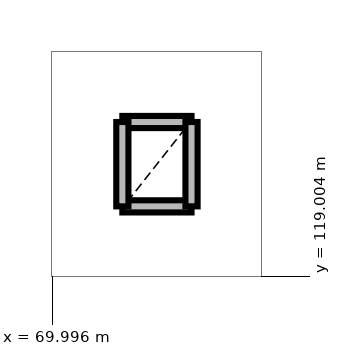
"""IFC4 building model, lengths in metres.
Left out: names, types, materials, properties, quantities, classifications, styles, units other than length and angle.
Written with IfcOpenShell. Run it as: python <this file> out.ifc"""

import sys

from ifc_helpers import new_model, si_unit, direction, frame, frame_2d, origin, place, context, subcontext, project, spatial, rectangle, extrude, element, save


model = new_model("IFC4")
c1 = context("Model", 3, precision=1e-05, world=origin(), true_north=direction((0.0, 1.0)))
c2 = subcontext(c1, "Body", "Model", "MODEL_VIEW")
j1 = project(units=[si_unit("LENGTHUNIT", "METRE"), si_unit("PLANEANGLEUNIT", "RADIAN")], contexts=[c1])
p1 = place(None, origin())
s1 = spatial("IfcSite", under=j1, at=p1, CompositionType="ELEMENT")
p2 = place(p1, origin())
s2 = spatial("IfcBuilding", under=s1, at=p2, CompositionType="ELEMENT")
p3 = place(p2, origin())
s3 = spatial("IfcBuildingStorey", under=s2, at=p3, CompositionType="ELEMENT", Elevation=0.0)
for number, where, z_axis, x_axis in (
    (1, (70.92, 119.92, 0.0), (0.0, 0.0, 1.0), (1.0, 0.0, 0.0)),
    (2, (71.83, 121.03, 0.0), (0.0, 0.0, 1.0), (-1.0, 0.0, 0.0)),
):
    element("IfcWall", number, at=place(p3, frame(where, z_axis=z_axis, x_axis=x_axis)), inside=s3, PredefinedType="PARTITIONING", context=c2, shape_type="SweptSolid", body=[
        extrude(rectangle(XDim=0.91, YDim=0.16, at=frame_2d((0.455, 0.0))), origin(), (0.0, 0.0, 1.0), 4.55),
    ])
for number, where, z_axis, x_axis in (
    (3, (70.92, 121.03, 0.0), (0.0, 0.0, 1.0), (0.0, -1.0, 0.0)),
    (4, (71.83, 119.92, 0.0), (0.0, 0.0, 1.0), (0.0, 1.0, 0.0)),
):
    element("IfcWall", number, at=place(p3, frame(where, z_axis=z_axis, x_axis=x_axis)), inside=s3, PredefinedType="PARTITIONING", context=c2, shape_type="SweptSolid", body=[
        extrude(rectangle(XDim=1.11, YDim=0.16, at=frame_2d((0.555, 0.0))), origin(), (0.0, 0.0, 1.0), 4.55),
    ])
save(model, sys.argv[1])
